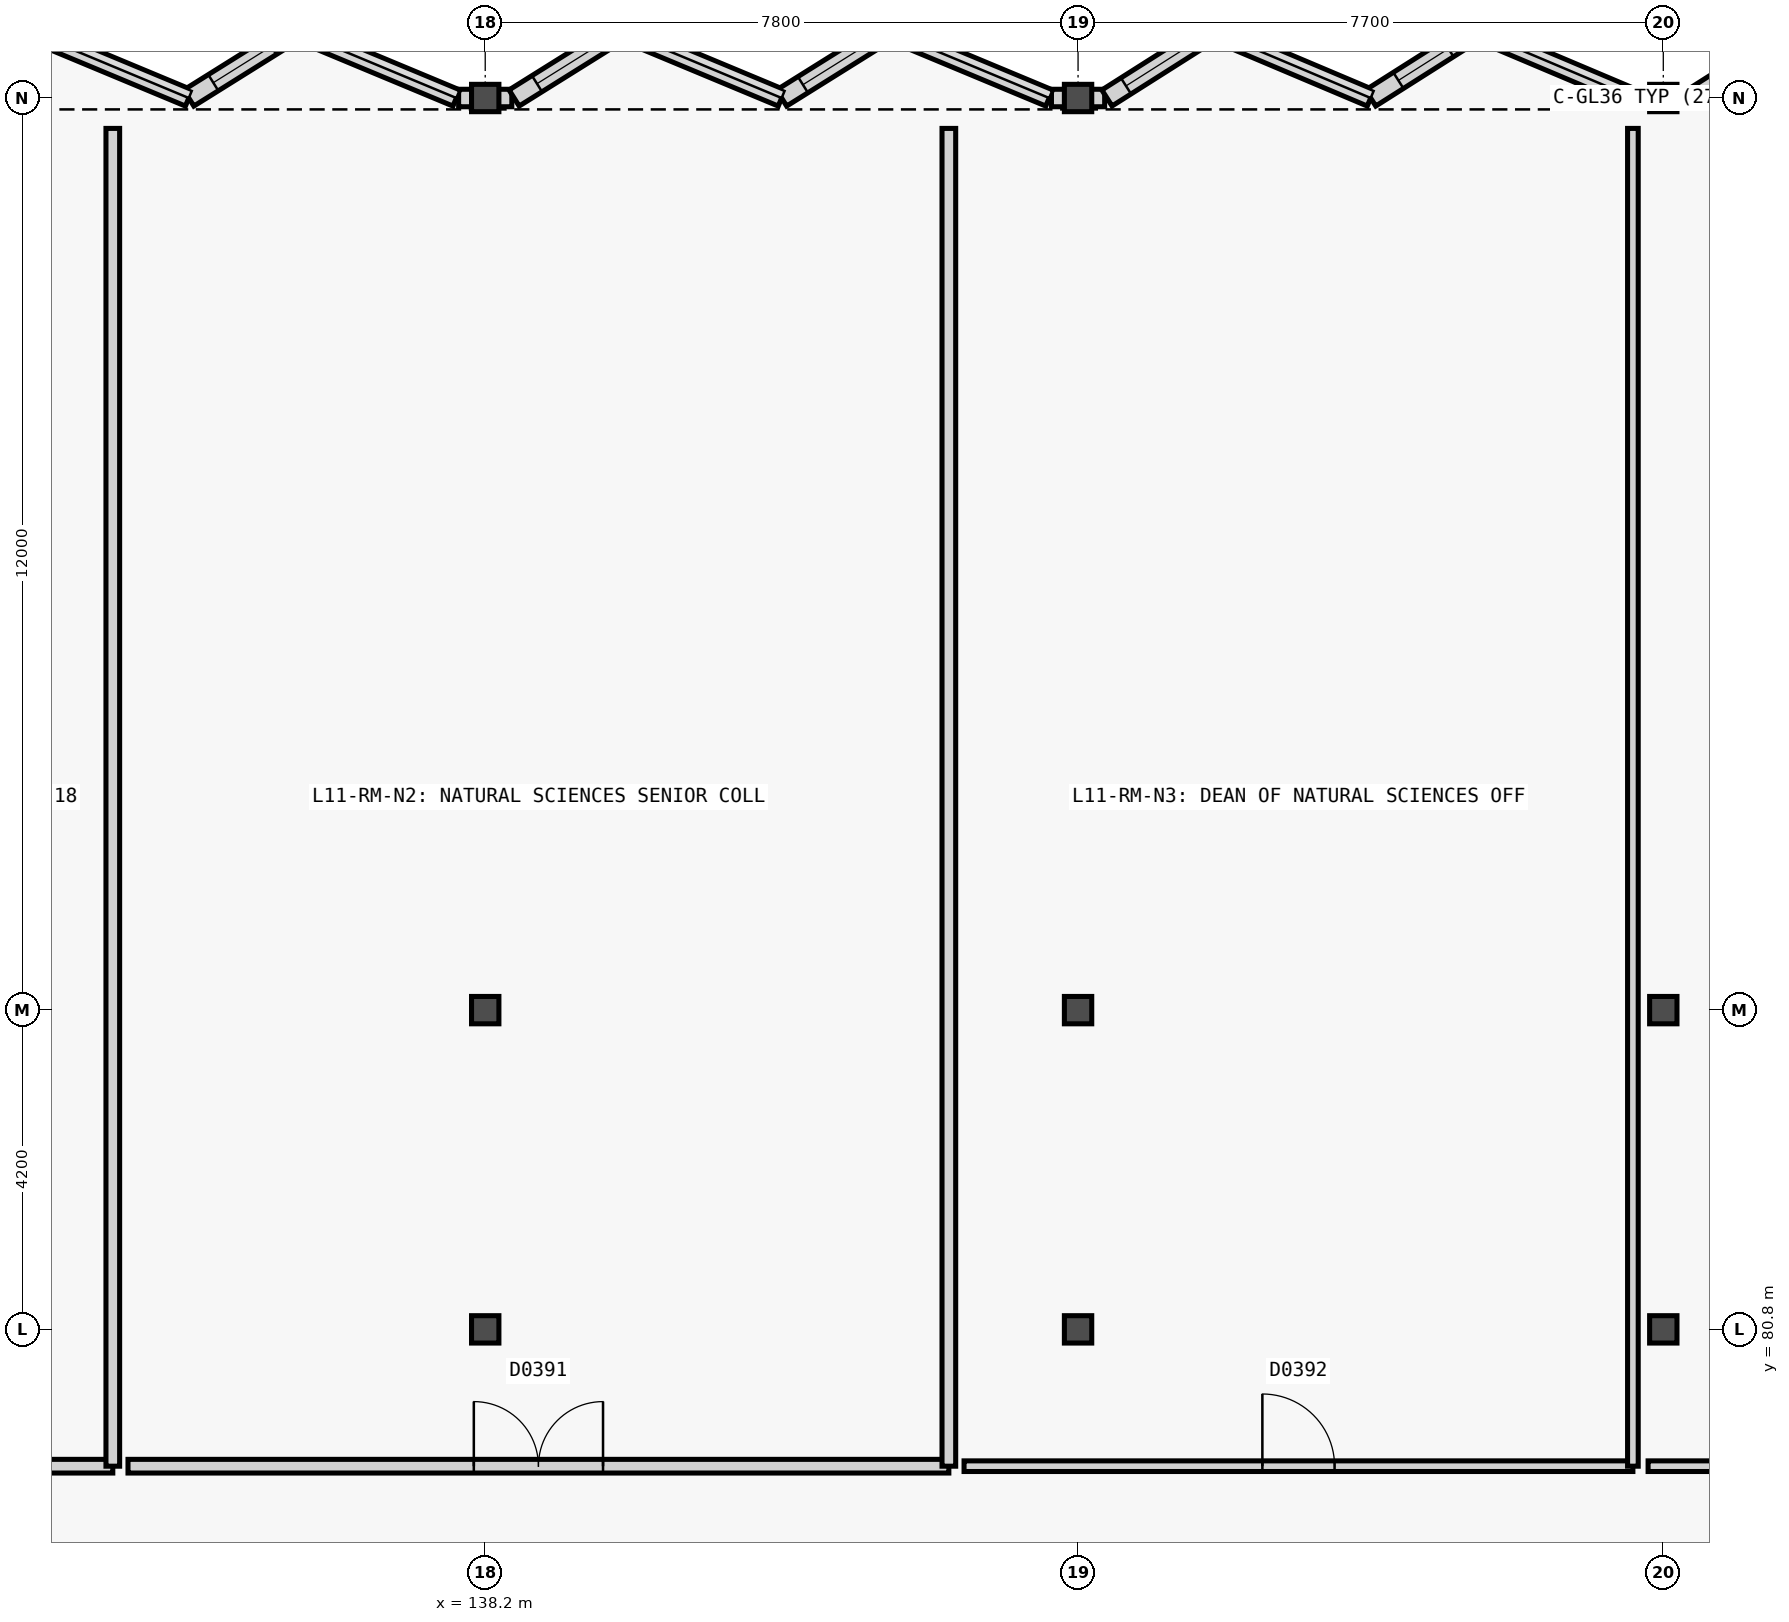
"""IFC4 building model, lengths in metres.
Left out: names, types, materials, properties, quantities, classifications, styles, units other than length and angle.
Written with IfcOpenShell. Run it as: python <this file> out.ifc"""

import sys

from ifc_helpers import new_model, si_unit, direction, frame, frame_2d, origin, origin_2d, place, context, subcontext, project, spatial, rectangle, extrude, element, fill, save


model = new_model("IFC4")
c1 = context("Model", 3, precision=1e-05, world=origin(), true_north=direction((0.0, 1.0)))
c2 = subcontext(c1, "Body", "Model", "MODEL_VIEW")
j1 = project(units=[si_unit("LENGTHUNIT", "METRE"), si_unit("PLANEANGLEUNIT", "RADIAN")], contexts=[c1])
p1 = place(None, origin())
s1 = spatial("IfcSite", under=j1, at=p1, CompositionType="ELEMENT")
p2 = place(p1, origin())
s2 = spatial("IfcBuilding", under=s1, at=p2, CompositionType="ELEMENT")
p3 = place(p2, frame((0.0, 0.0, 43.2)))
s3 = spatial("IfcBuildingStorey", under=s2, at=p3, CompositionType="ELEMENT", Elevation=43.2)
for number, where, z_axis, x_axis in (
    (1, (138.2, 80.8, 0.0), (0.0, 0.0, 1.0), (1.0, 0.0, 0.0)),
    (2, (138.2, 85.0, 0.0), (0.0, 0.0, 1.0), (1.0, 0.0, 0.0)),
    (3, (138.2, 97.0, 0.0), (0.0, 0.0, 1.0), (1.0, 0.0, 0.0)),
    (4, (146.0, 80.8, 0.0), (0.0, 0.0, 1.0), (1.0, 0.0, 0.0)),
    (5, (146.0, 85.0, 0.0), (0.0, 0.0, 1.0), (1.0, 0.0, 0.0)),
    (6, (146.0, 97.0, 0.0), (0.0, 0.0, 1.0), (1.0, 0.0, 0.0)),
    (7, (153.7, 80.8, 0.0), (0.0, 0.0, 1.0), (1.0, 0.0, 0.0)),
    (8, (153.7, 85.0, 0.0), (0.0, 0.0, 1.0), (1.0, 0.0, 0.0)),
    (9, (153.7, 97.0, 0.0), (0.0, 0.0, 1.0), (1.0, 0.0, 0.0)),
):
    element("IfcColumn", number, at=place(p3, frame(where, z_axis=z_axis, x_axis=x_axis)), inside=s3, PredefinedType="COLUMN", context=c2, shape_type="SweptSolid", body=[
        extrude(rectangle(XDim=0.36, YDim=0.36, at=origin_2d()), origin(), (0.0, 0.0, 1.0), 3.66),
    ])
p4 = place(p3, frame((137.85, 97.0, 0.0), z_axis=(0.0, 0.0, 1.0), x_axis=(1.0, 0.0, 0.0)))
e10 = element("IfcWall", 10, at=p4, inside=s3, PredefinedType="SOLIDWALL", context=c2, shape_type="SweptSolid", body=[
    extrude(rectangle(XDim=0.35, YDim=0.23, at=frame_2d((0.175, 0.0))), origin(), (0.0, 0.0, 1.0), 3.66),
])
for number, where, z_axis, x_axis in (
    (11, (138.2, 97.0, 0.0), (0.0, 0.0, 1.0), (1.0, 0.0, 0.0)),
    (12, (145.65, 97.0, 0.0), (0.0, 0.0, 1.0), (1.0, 0.0, 0.0)),
    (13, (146.0, 97.0, 0.0), (0.0, 0.0, 1.0), (1.0, 0.0, 0.0)),
):
    element("IfcWall", number, at=place(p3, frame(where, z_axis=z_axis, x_axis=x_axis)), inside=s3, PredefinedType="SOLIDWALL", context=c2, shape_type="SweptSolid", body=[
        extrude(rectangle(XDim=0.35, YDim=0.23, at=frame_2d((0.175, 0.0))), origin(), (0.0, 0.0, 1.0), 3.66),
    ])
p5 = place(p3, frame((153.35, 97.0, 0.0), z_axis=(0.0, 0.0, 1.0), x_axis=(1.0, 0.0, 0.0)))
e14 = element("IfcWall", 14, at=p5, inside=s3, PredefinedType="SOLIDWALL", context=c2, shape_type="SweptSolid", body=[
    extrude(rectangle(XDim=0.35, YDim=0.23, at=frame_2d((0.175, 0.0))), origin(), (0.0, 0.0, 1.0), 3.66),
])
p6 = place(p3, frame((153.7, 97.0, 0.0), z_axis=(0.0, 0.0, 1.0), x_axis=(1.0, 0.0, 0.0)))
e15 = element("IfcWall", 15, at=p6, inside=s3, PredefinedType="SOLIDWALL", context=c2, shape_type="SweptSolid", body=[
    extrude(rectangle(XDim=0.35, YDim=0.23, at=frame_2d((0.175, 0.0))), origin(), (0.0, 0.0, 1.0), 3.66),
])
p7 = place(p3, frame((132.188, 97.88, 0.0), z_axis=(0.0, 0.0, 1.0), x_axis=(0.92309902008, -0.384562347517, 0.0)))
e16 = element("IfcWall", 16, at=p7, inside=s3, PredefinedType="SOLIDWALL", context=c2, shape_type="SweptSolid", body=[
    extrude(rectangle(XDim=2.288, YDim=0.23, at=frame_2d((1.144, 0.0))), origin(), (0.0, 0.0, 1.0), 3.66),
])
p8 = place(p3, frame((134.3, 97.0, 0.0), z_axis=(0.0, 0.0, 1.0), x_axis=(0.848023086369, 0.529959286158, 0.0)))
e17 = element("IfcWall", 17, at=p8, inside=s3, PredefinedType="SOLIDWALL", context=c2, shape_type="SweptSolid", body=[
    extrude(rectangle(XDim=1.66, YDim=0.25, at=frame_2d((0.83, 0.0))), origin(), (0.0, 0.0, 1.0), 3.66),
])
p9 = place(p8, frame((0.38, 0.0, 0.82)))
e18 = element("IfcOpeningElement", 18, at=p9, cuts=e17, PredefinedType="OPENING", context=c2, shape_type="SweptSolid", body=[
    extrude(rectangle(XDim=0.9, YDim=1.45, at=frame_2d((0.45, 0.725))), frame((0.0, 0.135, 0.0), z_axis=(0.0, -1.0, 0.0), x_axis=(1.0, 0.0, 0.0)), (0.0, 0.0, 1.0), 0.27),
])
p10 = place(p3, frame((135.708, 97.88, 0.0), z_axis=(0.0, 0.0, 1.0), x_axis=(0.92309902008, -0.384562347517, 0.0)))
e19 = element("IfcWall", 19, at=p10, inside=s3, PredefinedType="SOLIDWALL", context=c2, shape_type="SweptSolid", body=[
    extrude(rectangle(XDim=2.288, YDim=0.23, at=frame_2d((1.144, 0.0))), origin(), (0.0, 0.0, 1.0), 3.66),
])
p11 = place(p3, frame((138.58, 97.0, 0.0), z_axis=(0.0, 0.0, 1.0), x_axis=(0.848023086369, 0.529959286158, 0.0)))
e20 = element("IfcWall", 20, at=p11, inside=s3, PredefinedType="SOLIDWALL", context=c2, shape_type="SweptSolid", body=[
    extrude(rectangle(XDim=1.66, YDim=0.25, at=frame_2d((0.83, 0.0))), origin(), (0.0, 0.0, 1.0), 3.66),
])
p12 = place(p11, frame((0.355, 0.0, 0.82)))
e21 = element("IfcOpeningElement", 21, at=p12, cuts=e20, PredefinedType="OPENING", context=c2, shape_type="SweptSolid", body=[
    extrude(rectangle(XDim=0.95, YDim=1.5, at=frame_2d((0.475, 0.75))), frame((0.0, 0.135, 0.0), z_axis=(0.0, -1.0, 0.0), x_axis=(1.0, 0.0, 0.0)), (0.0, 0.0, 1.0), 0.27),
])
p13 = place(p3, frame((139.988, 97.88, 0.0), z_axis=(0.0, 0.0, 1.0), x_axis=(0.92309902008, -0.384562347517, 0.0)))
e22 = element("IfcWall", 22, at=p13, inside=s3, PredefinedType="SOLIDWALL", context=c2, shape_type="SweptSolid", body=[
    extrude(rectangle(XDim=2.288, YDim=0.23, at=frame_2d((1.144, 0.0))), origin(), (0.0, 0.0, 1.0), 3.66),
])
p14 = place(p3, frame((142.1, 97.0, 0.0), z_axis=(0.0, 0.0, 1.0), x_axis=(0.848023086369, 0.529959286158, 0.0)))
e23 = element("IfcWall", 23, at=p14, inside=s3, PredefinedType="SOLIDWALL", context=c2, shape_type="SweptSolid", body=[
    extrude(rectangle(XDim=1.66, YDim=0.25, at=frame_2d((0.83, 0.0))), origin(), (0.0, 0.0, 1.0), 3.66),
])
p15 = place(p14, frame((0.33, 0.0, 0.82)))
e24 = element("IfcOpeningElement", 24, at=p15, cuts=e23, PredefinedType="OPENING", context=c2, shape_type="SweptSolid", body=[
    extrude(rectangle(XDim=1.0, YDim=1.35, at=frame_2d((0.5, 0.675))), frame((0.0, 0.135, 0.0), z_axis=(0.0, -1.0, 0.0), x_axis=(1.0, 0.0, 0.0)), (0.0, 0.0, 1.0), 0.27),
])
p16 = place(p3, frame((143.508, 97.88, 0.0), z_axis=(0.0, 0.0, 1.0), x_axis=(0.92309902008, -0.384562347517, 0.0)))
e25 = element("IfcWall", 25, at=p16, inside=s3, PredefinedType="SOLIDWALL", context=c2, shape_type="SweptSolid", body=[
    extrude(rectangle(XDim=2.288, YDim=0.23, at=frame_2d((1.144, 0.0))), origin(), (0.0, 0.0, 1.0), 3.66),
])
p17 = place(p3, frame((146.38, 97.0, 0.0), z_axis=(0.0, 0.0, 1.0), x_axis=(0.844626536799, 0.535355968805, 0.0)))
e26 = element("IfcWall", 26, at=p17, inside=s3, PredefinedType="SOLIDWALL", context=c2, shape_type="SweptSolid", body=[
    extrude(rectangle(XDim=1.644, YDim=0.25, at=frame_2d((0.822, 0.0))), origin(), (0.0, 0.0, 1.0), 3.66),
])
p18 = place(p17, frame((0.297, 0.0, 0.82)))
e27 = element("IfcOpeningElement", 27, at=p18, cuts=e26, PredefinedType="OPENING", context=c2, shape_type="SweptSolid", body=[
    extrude(rectangle(XDim=1.05, YDim=1.4, at=frame_2d((0.525, 0.7))), frame((0.0, 0.135, 0.0), z_axis=(0.0, -1.0, 0.0), x_axis=(1.0, 0.0, 0.0)), (0.0, 0.0, 1.0), 0.27),
])
p19 = place(p3, frame((147.768, 97.88, 0.0), z_axis=(0.0, 0.0, 1.0), x_axis=(0.921122216024, -0.389273506866, 0.0)))
e28 = element("IfcWall", 28, at=p19, inside=s3, PredefinedType="SOLIDWALL", context=c2, shape_type="SweptSolid", body=[
    extrude(rectangle(XDim=2.26, YDim=0.23, at=frame_2d((1.13, 0.0))), origin(), (0.0, 0.0, 1.0), 3.66),
])
p20 = place(p3, frame((149.85, 97.0, 0.0), z_axis=(0.0, 0.0, 1.0), x_axis=(0.844583954912, 0.535423143976, 0.0)))
e29 = element("IfcWall", 29, at=p20, inside=s3, PredefinedType="SOLIDWALL", context=c2, shape_type="SweptSolid", body=[
    extrude(rectangle(XDim=1.643, YDim=0.25, at=frame_2d((0.822, 0.0))), origin(), (0.0, 0.0, 1.0), 3.66),
])
p21 = place(p20, frame((0.432, 0.0, 0.82)))
e30 = element("IfcOpeningElement", 30, at=p21, cuts=e29, PredefinedType="OPENING", context=c2, shape_type="SweptSolid", body=[
    extrude(rectangle(XDim=0.78, YDim=1.3, at=frame_2d((0.39, 0.65))), frame((0.0, 0.135, 0.0), z_axis=(0.0, -1.0, 0.0), x_axis=(1.0, 0.0, 0.0)), (0.0, 0.0, 1.0), 0.27),
])
p22 = place(p3, frame((151.238, 97.88, 0.0), z_axis=(0.0, 0.0, 1.0), x_axis=(0.921122216024, -0.389273506866, 0.0)))
e31 = element("IfcWall", 31, at=p22, inside=s3, PredefinedType="SOLIDWALL", context=c2, shape_type="SweptSolid", body=[
    extrude(rectangle(XDim=2.26, YDim=0.23, at=frame_2d((1.13, 0.0))), origin(), (0.0, 0.0, 1.0), 3.66),
])
p23 = place(p3, frame((154.08, 97.0, 0.0), z_axis=(0.0, 0.0, 1.0), x_axis=(0.844583954912, 0.535423143976, 0.0)))
e32 = element("IfcWall", 32, at=p23, inside=s3, PredefinedType="SOLIDWALL", context=c2, shape_type="SweptSolid", body=[
    extrude(rectangle(XDim=1.643, YDim=0.25, at=frame_2d((0.822, 0.0))), origin(), (0.0, 0.0, 1.0), 3.66),
])
p24 = place(p23, frame((0.362, 0.0, 0.82)))
e33 = element("IfcOpeningElement", 33, at=p24, cuts=e32, PredefinedType="OPENING", context=c2, shape_type="SweptSolid", body=[
    extrude(rectangle(XDim=0.92, YDim=1.38, at=frame_2d((0.46, 0.69))), frame((0.0, 0.135, 0.0), z_axis=(0.0, -1.0, 0.0), x_axis=(1.0, 0.0, 0.0)), (0.0, 0.0, 1.0), 0.27),
])
p25 = place(p3, frame((122.8, 79.0, 0.0), z_axis=(0.0, 0.0, 1.0), x_axis=(1.0, 0.0, 0.0)))
e34 = element("IfcWall", 34, at=p25, inside=s3, PredefinedType="PARTITIONING", context=c2, shape_type="SweptSolid", body=[
    extrude(rectangle(XDim=10.5, YDim=0.18, at=frame_2d((5.25, 0.0))), origin(), (0.0, 0.0, 1.0), 3.64),
])
p26 = place(p25, frame((4.425, 0.0, 0.0)))
e35 = element("IfcOpeningElement", 35, at=p26, cuts=e34, PredefinedType="OPENING", context=c2, shape_type="SweptSolid", body=[
    extrude(rectangle(XDim=1.65, YDim=2.3, at=frame_2d((0.825, 1.15))), frame((0.0, 0.1, 0.0), z_axis=(0.0, -1.0, 0.0), x_axis=(1.0, 0.0, 0.0)), (0.0, 0.0, 1.0), 0.2),
])
p27 = place(p3, frame((133.3, 79.0, 0.0), z_axis=(0.0, 0.0, 1.0), x_axis=(0.0, 1.0, 0.0)))
e36 = element("IfcWall", 36, at=p27, inside=s3, PredefinedType="PARTITIONING", context=c2, shape_type="SweptSolid", body=[
    extrude(rectangle(XDim=17.6, YDim=0.18, at=frame_2d((8.8, 0.0))), origin(), (0.0, 0.0, 1.0), 3.64),
])
p28 = place(p3, frame((133.5, 79.0, 0.0), z_axis=(0.0, 0.0, 1.0), x_axis=(1.0, 0.0, 0.0)))
e37 = element("IfcWall", 37, at=p28, inside=s3, PredefinedType="PARTITIONING", context=c2, shape_type="SweptSolid", body=[
    extrude(rectangle(XDim=10.8, YDim=0.18, at=frame_2d((5.4, 0.0))), origin(), (0.0, 0.0, 1.0), 3.64),
])
p29 = place(p28, frame((4.55, 0.0, 0.0)))
e38 = element("IfcOpeningElement", 38, at=p29, cuts=e37, PredefinedType="OPENING", context=c2, shape_type="SweptSolid", body=[
    extrude(rectangle(XDim=1.7, YDim=2.25, at=frame_2d((0.85, 1.125))), frame((0.0, 0.1, 0.0), z_axis=(0.0, -1.0, 0.0), x_axis=(1.0, 0.0, 0.0)), (0.0, 0.0, 1.0), 0.2),
])
p30 = place(p3, frame((144.3, 79.0, 0.0), z_axis=(0.0, 0.0, 1.0), x_axis=(0.0, 1.0, 0.0)))
e39 = element("IfcWall", 39, at=p30, inside=s3, PredefinedType="PARTITIONING", context=c2, shape_type="SweptSolid", body=[
    extrude(rectangle(XDim=17.6, YDim=0.18, at=frame_2d((8.8, 0.0))), origin(), (0.0, 0.0, 1.0), 3.64),
])
p31 = place(p3, frame((144.5, 79.0, 0.0), z_axis=(0.0, 0.0, 1.0), x_axis=(1.0, 0.0, 0.0)))
e40 = element("IfcWall", 40, at=p31, inside=s3, PredefinedType="PARTITIONING", context=c2, shape_type="SweptSolid", body=[
    extrude(rectangle(XDim=8.8, YDim=0.14, at=frame_2d((4.4, 0.0))), origin(), (0.0, 0.0, 1.0), 3.64),
])
p32 = place(p31, frame((3.925, 0.0, 0.0)))
e41 = element("IfcOpeningElement", 41, at=p32, cuts=e40, PredefinedType="OPENING", context=c2, shape_type="SweptSolid", body=[
    extrude(rectangle(XDim=0.95, YDim=2.1, at=frame_2d((0.475, 1.05))), frame((0.0, 0.08, 0.0), z_axis=(0.0, -1.0, 0.0), x_axis=(1.0, 0.0, 0.0)), (0.0, 0.0, 1.0), 0.16),
])
p33 = place(p3, frame((153.3, 79.0, 0.0), z_axis=(0.0, 0.0, 1.0), x_axis=(0.0, 1.0, 0.0)))
e42 = element("IfcWall", 42, at=p33, inside=s3, PredefinedType="PARTITIONING", context=c2, shape_type="SweptSolid", body=[
    extrude(rectangle(XDim=17.6, YDim=0.14, at=frame_2d((8.8, 0.0))), origin(), (0.0, 0.0, 1.0), 3.64),
])
p34 = place(p3, frame((153.5, 79.0, 0.0), z_axis=(0.0, 0.0, 1.0), x_axis=(1.0, 0.0, 0.0)))
e43 = element("IfcWall", 43, at=p34, inside=s3, PredefinedType="PARTITIONING", context=c2, shape_type="SweptSolid", body=[
    extrude(rectangle(XDim=7.1, YDim=0.14, at=frame_2d((3.55, 0.0))), origin(), (0.0, 0.0, 1.0), 3.64),
])
p35 = place(p34, frame((3.05, 0.0, 0.0)))
e44 = element("IfcOpeningElement", 44, at=p35, cuts=e43, PredefinedType="OPENING", context=c2, shape_type="SweptSolid", body=[
    extrude(rectangle(XDim=1.0, YDim=2.15, at=frame_2d((0.5, 1.075))), frame((0.0, 0.08, 0.0), z_axis=(0.0, -1.0, 0.0), x_axis=(1.0, 0.0, 0.0)), (0.0, 0.0, 1.0), 0.16),
])
p36 = place(p9, origin())
e45 = element("IfcWindow", 45, at=p36, inside=s3, PartitioningType="SINGLE_PANEL", PredefinedType="WINDOW", context=c2, shape_type="SweptSolid", body=[
    extrude(rectangle(XDim=0.9, YDim=1.45, at=frame_2d((0.45, 0.725))), frame((0.0, 0.03, 0.0), z_axis=(0.0, -1.0, 0.0), x_axis=(1.0, 0.0, 0.0)), (0.0, 0.0, 1.0), 0.06),
])
fill(e18, e45)
p37 = place(p12, origin())
e46 = element("IfcWindow", 46, at=p37, inside=s3, PartitioningType="SINGLE_PANEL", PredefinedType="WINDOW", context=c2, shape_type="SweptSolid", body=[
    extrude(rectangle(XDim=0.95, YDim=1.5, at=frame_2d((0.475, 0.75))), frame((0.0, 0.03, 0.0), z_axis=(0.0, -1.0, 0.0), x_axis=(1.0, 0.0, 0.0)), (0.0, 0.0, 1.0), 0.06),
])
fill(e21, e46)
p38 = place(p15, origin())
e47 = element("IfcWindow", 47, at=p38, inside=s3, PartitioningType="SINGLE_PANEL", PredefinedType="WINDOW", context=c2, shape_type="SweptSolid", body=[
    extrude(rectangle(XDim=1.0, YDim=1.35, at=frame_2d((0.5, 0.675))), frame((0.0, 0.03, 0.0), z_axis=(0.0, -1.0, 0.0), x_axis=(1.0, 0.0, 0.0)), (0.0, 0.0, 1.0), 0.06),
])
fill(e24, e47)
p39 = place(p18, origin())
e48 = element("IfcWindow", 48, at=p39, inside=s3, PartitioningType="SINGLE_PANEL", PredefinedType="WINDOW", context=c2, shape_type="SweptSolid", body=[
    extrude(rectangle(XDim=1.05, YDim=1.4, at=frame_2d((0.525, 0.7))), frame((0.0, 0.03, 0.0), z_axis=(0.0, -1.0, 0.0), x_axis=(1.0, 0.0, 0.0)), (0.0, 0.0, 1.0), 0.06),
])
fill(e27, e48)
p40 = place(p21, origin())
e49 = element("IfcWindow", 49, at=p40, inside=s3, PartitioningType="SINGLE_PANEL", PredefinedType="WINDOW", context=c2, shape_type="SweptSolid", body=[
    extrude(rectangle(XDim=0.78, YDim=1.3, at=frame_2d((0.39, 0.65))), frame((0.0, 0.03, 0.0), z_axis=(0.0, -1.0, 0.0), x_axis=(1.0, 0.0, 0.0)), (0.0, 0.0, 1.0), 0.06),
])
fill(e30, e49)
p41 = place(p29, origin())
e50 = element("IfcDoor", 50, at=p41, inside=s3, OperationType="DOUBLE_DOOR_SINGLE_SWING", PredefinedType="DOOR", context=c2, shape_type="SweptSolid", body=[
    extrude(rectangle(XDim=1.7, YDim=2.25, at=frame_2d((0.85, 1.125))), frame((0.0, 0.025, 0.0), z_axis=(0.0, -1.0, 0.0), x_axis=(1.0, 0.0, 0.0)), (0.0, 0.0, 1.0), 0.05),
])
fill(e38, e50)
p42 = place(p32, origin())
e51 = element("IfcDoor", 51, at=p42, inside=s3, OperationType="SINGLE_SWING_LEFT", PredefinedType="DOOR", context=c2, shape_type="SweptSolid", body=[
    extrude(rectangle(XDim=0.95, YDim=2.1, at=frame_2d((0.475, 1.05))), frame((0.0, 0.025, 0.0), z_axis=(0.0, -1.0, 0.0), x_axis=(1.0, 0.0, 0.0)), (0.0, 0.0, 1.0), 0.05),
])
fill(e41, e51)
save(model, sys.argv[1])
